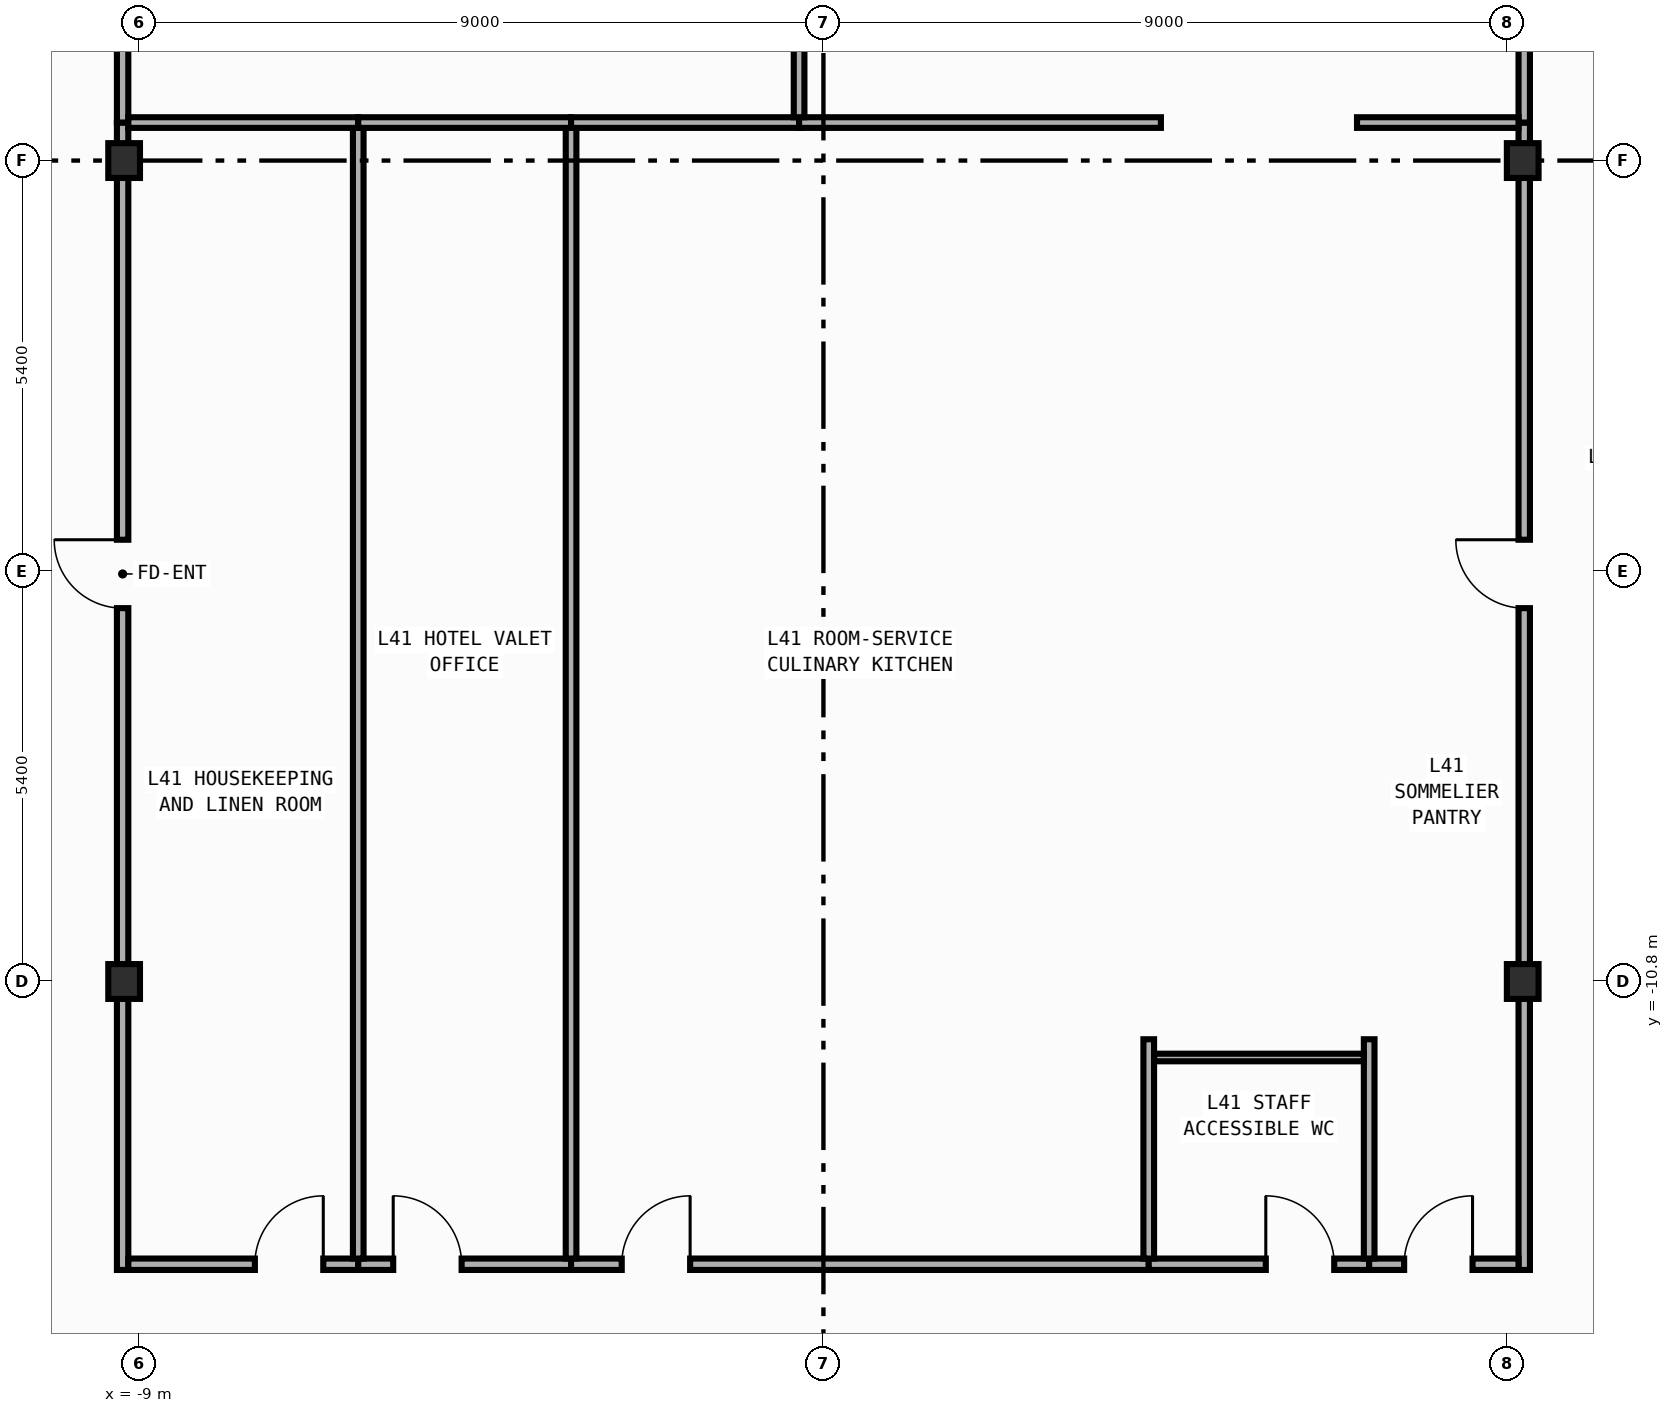
"""IFC4 building model, lengths in metres.
Left out: names, types, materials, properties, quantities, classifications, styles, units other than length and angle.
Written with IfcOpenShell. Run it as: python <this file> out.ifc"""

import sys

from ifc_helpers import new_model, si_unit, direction, frame, frame_2d, origin, origin_2d, place, context, subcontext, project, spatial, rectangle, i_section, extrude, element, fill, save


model = new_model("IFC4")
c1 = context("Model", 3, precision=1e-05, world=origin(), true_north=direction((0.0, 1.0)))
c2 = subcontext(c1, "Body", "Model", "MODEL_VIEW")
j1 = project(units=[si_unit("LENGTHUNIT", "METRE"), si_unit("PLANEANGLEUNIT", "RADIAN")], contexts=[c1])
p1 = place(None, origin())
s1 = spatial("IfcSite", under=j1, at=p1, CompositionType="ELEMENT")
p2 = place(p1, origin())
s2 = spatial("IfcBuilding", under=s1, at=p2, CompositionType="ELEMENT")
p3 = place(p2, frame((0.0, 0.0, 180.2)))
s3 = spatial("IfcBuildingStorey", under=s2, at=p3, CompositionType="ELEMENT", Elevation=180.2)
for number, where, z_axis, x_axis in (
    (1, (-9.2, -10.8, 0.0), (0.0, 0.0, 1.0), (1.0, 0.0, 0.0)),
    (2, (-9.2, 0.0, 0.0), (0.0, 0.0, 1.0), (1.0, 0.0, 0.0)),
    (3, (9.2, -10.8, 0.0), (0.0, 0.0, 1.0), (1.0, 0.0, 0.0)),
    (4, (9.2, 0.0, 0.0), (0.0, 0.0, 1.0), (1.0, 0.0, 0.0)),
):
    element("IfcColumn", number, at=place(p3, frame(where, z_axis=z_axis, x_axis=x_axis)), inside=s3, PredefinedType="COLUMN", context=c2, shape_type="SweptSolid", body=[
        extrude(i_section(OverallWidth=0.417, OverallDepth=0.458, WebThickness=0.03, FlangeThickness=0.05, FilletRadius=0.022, at=origin_2d()), origin(), (0.0, 0.0, 1.0), 3.8),
    ])
p4 = place(p3, frame((-9.22, -14.595, 0.0), z_axis=(0.0, 0.0, 1.0), x_axis=(0.0, 1.0, 0.0)))
e5 = element("IfcWall", 5, at=p4, inside=s3, PredefinedType="PARTITIONING", context=c2, shape_type="SweptSolid", body=[
    extrude(rectangle(XDim=15.095, YDim=0.15, at=frame_2d((7.547, 0.0))), origin(), (0.0, 0.0, 1.0), 2.952),
])
p5 = place(p4, frame((8.707, 0.0, 0.0)))
e6 = element("IfcOpeningElement", 6, at=p5, cuts=e5, PredefinedType="OPENING", context=c2, shape_type="SweptSolid", body=[
    extrude(rectangle(XDim=0.9, YDim=2.15, at=frame_2d((0.45, 1.075))), frame((0.0, 0.085, 0.0), z_axis=(0.0, -1.0, 0.0), x_axis=(1.0, 0.0, 0.0)), (0.0, 0.0, 1.0), 0.17),
])
p6 = place(p3, frame((-9.22, 0.5, 0.0), z_axis=(0.0, 0.0, 1.0), x_axis=(0.0, 1.0, 0.0)))
e7 = element("IfcWall", 7, at=p6, inside=s3, PredefinedType="PARTITIONING", context=c2, shape_type="SweptSolid", body=[
    extrude(rectangle(XDim=15.395, YDim=0.15, at=frame_2d((7.698, 0.0))), origin(), (0.0, 0.0, 1.0), 2.952),
])
p7 = place(p6, frame((4.512, 0.0, 0.0)))
e8 = element("IfcOpeningElement", 8, at=p7, cuts=e7, PredefinedType="OPENING", context=c2, shape_type="SweptSolid", body=[
    extrude(rectangle(XDim=0.9, YDim=2.15, at=frame_2d((0.45, 1.075))), frame((0.0, 0.085, 0.0), z_axis=(0.0, -1.0, 0.0), x_axis=(1.0, 0.0, 0.0)), (0.0, 0.0, 1.0), 0.17),
])
p8 = place(p3, frame((9.22, -14.595, 0.0), z_axis=(0.0, 0.0, 1.0), x_axis=(0.0, 1.0, 0.0)))
e9 = element("IfcWall", 9, at=p8, inside=s3, PredefinedType="PARTITIONING", context=c2, shape_type="SweptSolid", body=[
    extrude(rectangle(XDim=15.095, YDim=0.15, at=frame_2d((7.547, 0.0))), origin(), (0.0, 0.0, 1.0), 2.952),
])
p9 = place(p8, frame((8.707, 0.0, 0.0)))
e10 = element("IfcOpeningElement", 10, at=p9, cuts=e9, PredefinedType="OPENING", context=c2, shape_type="SweptSolid", body=[
    extrude(rectangle(XDim=0.9, YDim=2.15, at=frame_2d((0.45, 1.075))), frame((0.0, 0.085, 0.0), z_axis=(0.0, -1.0, 0.0), x_axis=(1.0, 0.0, 0.0)), (0.0, 0.0, 1.0), 0.17),
])
p10 = place(p3, frame((9.22, 0.5, 0.0), z_axis=(0.0, 0.0, 1.0), x_axis=(0.0, 1.0, 0.0)))
e11 = element("IfcWall", 11, at=p10, inside=s3, PredefinedType="PARTITIONING", context=c2, shape_type="SweptSolid", body=[
    extrude(rectangle(XDim=15.395, YDim=0.15, at=frame_2d((7.698, 0.0))), origin(), (0.0, 0.0, 1.0), 2.952),
])
p11 = place(p10, frame((4.512, 0.0, 0.0)))
e12 = element("IfcOpeningElement", 12, at=p11, cuts=e11, PredefinedType="OPENING", context=c2, shape_type="SweptSolid", body=[
    extrude(rectangle(XDim=0.9, YDim=2.15, at=frame_2d((0.45, 1.075))), frame((0.0, 0.085, 0.0), z_axis=(0.0, -1.0, 0.0), x_axis=(1.0, 0.0, 0.0)), (0.0, 0.0, 1.0), 0.17),
])
p12 = place(p3, frame((-9.145, -14.52, 0.0), z_axis=(0.0, 0.0, 1.0), x_axis=(1.0, 0.0, 0.0)))
e13 = element("IfcWall", 13, at=p12, inside=s3, PredefinedType="PARTITIONING", context=c2, shape_type="SweptSolid", body=[
    extrude(rectangle(XDim=3.025, YDim=0.15, at=frame_2d((1.512, 0.0))), origin(), (0.0, 0.0, 1.0), 3.54),
])
p13 = place(p12, frame((1.665, 0.0, 0.0)))
e14 = element("IfcOpeningElement", 14, at=p13, cuts=e13, PredefinedType="OPENING", context=c2, shape_type="SweptSolid", body=[
    extrude(rectangle(XDim=0.9, YDim=2.15, at=frame_2d((0.45, 1.075))), frame((0.0, 0.085, 0.0), z_axis=(0.0, -1.0, 0.0), x_axis=(1.0, 0.0, 0.0)), (0.0, 0.0, 1.0), 0.17),
])
p14 = place(p3, frame((-6.12, -14.52, 0.0), z_axis=(0.0, 0.0, 1.0), x_axis=(1.0, 0.0, 0.0)))
e15 = element("IfcWall", 15, at=p14, inside=s3, PredefinedType="PARTITIONING", context=c2, shape_type="SweptSolid", body=[
    extrude(rectangle(XDim=2.8, YDim=0.15, at=frame_2d((1.4, 0.0))), origin(), (0.0, 0.0, 1.0), 3.54),
])
p15 = place(p14, frame((0.46, 0.0, 0.0)))
e16 = element("IfcOpeningElement", 16, at=p15, cuts=e15, PredefinedType="OPENING", context=c2, shape_type="SweptSolid", body=[
    extrude(rectangle(XDim=0.9, YDim=2.15, at=frame_2d((0.45, 1.075))), frame((0.0, 0.085, 0.0), z_axis=(0.0, -1.0, 0.0), x_axis=(1.0, 0.0, 0.0)), (0.0, 0.0, 1.0), 0.17),
])
p16 = place(p3, frame((-3.32, -14.52, 0.0), z_axis=(0.0, 0.0, 1.0), x_axis=(1.0, 0.0, 0.0)))
e17 = element("IfcWall", 17, at=p16, inside=s3, PredefinedType="PARTITIONING", context=c2, shape_type="SweptSolid", body=[
    extrude(rectangle(XDim=7.6, YDim=0.15, at=frame_2d((3.8, 0.0))), origin(), (0.0, 0.0, 1.0), 3.54),
])
p17 = place(p16, frame((0.667, 0.0, 0.0)))
e18 = element("IfcOpeningElement", 18, at=p17, cuts=e17, PredefinedType="OPENING", context=c2, shape_type="SweptSolid", body=[
    extrude(rectangle(XDim=0.9, YDim=2.15, at=frame_2d((0.45, 1.075))), frame((0.0, 0.085, 0.0), z_axis=(0.0, -1.0, 0.0), x_axis=(1.0, 0.0, 0.0)), (0.0, 0.0, 1.0), 0.17),
])
p18 = place(p3, frame((4.28, -14.52, 0.0), z_axis=(0.0, 0.0, 1.0), x_axis=(1.0, 0.0, 0.0)))
e19 = element("IfcWall", 19, at=p18, inside=s3, PredefinedType="PARTITIONING", context=c2, shape_type="SweptSolid", body=[
    extrude(rectangle(XDim=2.9, YDim=0.15, at=frame_2d((1.45, 0.0))), origin(), (0.0, 0.0, 1.0), 3.54),
])
p19 = place(p18, frame((1.54, 0.0, 0.0)))
e20 = element("IfcOpeningElement", 20, at=p19, cuts=e19, PredefinedType="OPENING", context=c2, shape_type="SweptSolid", body=[
    extrude(rectangle(XDim=0.9, YDim=2.15, at=frame_2d((0.45, 1.075))), frame((0.0, 0.085, 0.0), z_axis=(0.0, -1.0, 0.0), x_axis=(1.0, 0.0, 0.0)), (0.0, 0.0, 1.0), 0.17),
])
p20 = place(p3, frame((7.18, -14.52, 0.0), z_axis=(0.0, 0.0, 1.0), x_axis=(1.0, 0.0, 0.0)))
e21 = element("IfcWall", 21, at=p20, inside=s3, PredefinedType="PARTITIONING", context=c2, shape_type="SweptSolid", body=[
    extrude(rectangle(XDim=1.965, YDim=0.15, at=frame_2d((0.982, 0.0))), origin(), (0.0, 0.0, 1.0), 3.54),
])
p21 = place(p20, frame((0.46, 0.0, 0.0)))
e22 = element("IfcOpeningElement", 22, at=p21, cuts=e21, PredefinedType="OPENING", context=c2, shape_type="SweptSolid", body=[
    extrude(rectangle(XDim=0.9, YDim=2.15, at=frame_2d((0.45, 1.075))), frame((0.0, 0.085, 0.0), z_axis=(0.0, -1.0, 0.0), x_axis=(1.0, 0.0, 0.0)), (0.0, 0.0, 1.0), 0.17),
])
p22 = place(p3, frame((-6.12, -14.445, 0.0), z_axis=(0.0, 0.0, 1.0), x_axis=(0.0, 1.0, 0.0)))
e23 = element("IfcWall", 23, at=p22, inside=s3, PredefinedType="PARTITIONING", context=c2, shape_type="SweptSolid", body=[
    extrude(rectangle(XDim=14.875, YDim=0.14, at=frame_2d((7.438, 0.0))), origin(), (0.0, 0.0, 1.0), 3.54),
])
p23 = place(p3, frame((-9.145, 0.5, 0.0), z_axis=(0.0, 0.0, 1.0), x_axis=(1.0, 0.0, 0.0)))
e24 = element("IfcWall", 24, at=p23, inside=s3, PredefinedType="PARTITIONING", context=c2, shape_type="SweptSolid", body=[
    extrude(rectangle(XDim=3.025, YDim=0.14, at=frame_2d((1.512, 0.0))), origin(), (0.0, 0.0, 1.0), 3.54),
])
p24 = place(p3, frame((-3.32, -14.445, 0.0), z_axis=(0.0, 0.0, 1.0), x_axis=(0.0, 1.0, 0.0)))
e25 = element("IfcWall", 25, at=p24, inside=s3, PredefinedType="PARTITIONING", context=c2, shape_type="SweptSolid", body=[
    extrude(rectangle(XDim=14.875, YDim=0.14, at=frame_2d((7.438, 0.0))), origin(), (0.0, 0.0, 1.0), 3.54),
])
p25 = place(p3, frame((-6.12, 0.5, 0.0), z_axis=(0.0, 0.0, 1.0), x_axis=(1.0, 0.0, 0.0)))
e26 = element("IfcWall", 26, at=p25, inside=s3, PredefinedType="PARTITIONING", context=c2, shape_type="SweptSolid", body=[
    extrude(rectangle(XDim=2.8, YDim=0.14, at=frame_2d((1.4, 0.0))), origin(), (0.0, 0.0, 1.0), 3.54),
])
p26 = place(p3, frame((4.28, -14.445, 0.0), z_axis=(0.0, 0.0, 1.0), x_axis=(0.0, 1.0, 0.0)))
e27 = element("IfcWall", 27, at=p26, inside=s3, PredefinedType="PARTITIONING", context=c2, shape_type="SweptSolid", body=[
    extrude(rectangle(XDim=2.885, YDim=0.14, at=frame_2d((1.442, 0.0))), origin(), (0.0, 0.0, 1.0), 3.54),
])
p27 = place(p3, frame((-3.32, 0.5, 0.0), z_axis=(0.0, 0.0, 1.0), x_axis=(1.0, 0.0, 0.0)))
e28 = element("IfcWall", 28, at=p27, inside=s3, PredefinedType="PARTITIONING", context=c2, shape_type="SweptSolid", body=[
    extrude(rectangle(XDim=3.0, YDim=0.14, at=frame_2d((1.5, 0.0))), origin(), (0.0, 0.0, 1.0), 3.54),
])
p28 = place(p3, frame((-0.32, 0.5, 0.0), z_axis=(0.0, 0.0, 1.0), x_axis=(1.0, 0.0, 0.0)))
e29 = element("IfcWall", 29, at=p28, inside=s3, PredefinedType="PARTITIONING", context=c2, shape_type="SweptSolid", body=[
    extrude(rectangle(XDim=4.76, YDim=0.14, at=frame_2d((2.38, 0.0))), origin(), (0.0, 0.0, 1.0), 3.54),
])
p29 = place(p3, frame((7.18, -14.445, 0.0), z_axis=(0.0, 0.0, 1.0), x_axis=(0.0, 1.0, 0.0)))
e30 = element("IfcWall", 30, at=p29, inside=s3, PredefinedType="PARTITIONING", context=c2, shape_type="SweptSolid", body=[
    extrude(rectangle(XDim=2.885, YDim=0.14, at=frame_2d((1.442, 0.0))), origin(), (0.0, 0.0, 1.0), 3.54),
])
p30 = place(p3, frame((7.02, 0.5, 0.0), z_axis=(0.0, 0.0, 1.0), x_axis=(1.0, 0.0, 0.0)))
e31 = element("IfcWall", 31, at=p30, inside=s3, PredefinedType="PARTITIONING", context=c2, shape_type="SweptSolid", body=[
    extrude(rectangle(XDim=2.125, YDim=0.14, at=frame_2d((1.062, 0.0))), origin(), (0.0, 0.0, 1.0), 3.54),
])
p31 = place(p3, frame((-0.32, 0.57, 0.0), z_axis=(0.0, 0.0, 1.0), x_axis=(0.0, 1.0, 0.0)))
e32 = element("IfcWall", 32, at=p31, inside=s3, PredefinedType="PARTITIONING", context=c2, shape_type="SweptSolid", body=[
    extrude(rectangle(XDim=15.175, YDim=0.14, at=frame_2d((7.587, 0.0))), origin(), (0.0, 0.0, 1.0), 3.54),
])
p32 = place(p3, frame((4.35, -11.8, 0.0), z_axis=(0.0, 0.0, 1.0), x_axis=(1.0, 0.0, 0.0)))
e33 = element("IfcWall", 33, at=p32, inside=s3, PredefinedType="PARTITIONING", context=c2, shape_type="SweptSolid", body=[
    extrude(rectangle(XDim=2.76, YDim=0.1, at=frame_2d((1.38, 0.0))), origin(), (0.0, 0.0, 1.0), 3.54),
])
p33 = place(p5, origin())
e34 = element("IfcDoor", 34, at=p33, inside=s3, OperationType="SINGLE_SWING_RIGHT", PredefinedType="DOOR", context=c2, shape_type="SweptSolid", body=[
    extrude(rectangle(XDim=0.9, YDim=2.15, at=frame_2d((0.45, 1.075))), frame((0.0, 0.025, 0.0), z_axis=(0.0, -1.0, 0.0), x_axis=(1.0, 0.0, 0.0)), (0.0, 0.0, 1.0), 0.05),
])
fill(e6, e34)
p34 = place(p9, origin())
e35 = element("IfcDoor", 35, at=p34, inside=s3, OperationType="SINGLE_SWING_RIGHT", PredefinedType="DOOR", context=c2, shape_type="SweptSolid", body=[
    extrude(rectangle(XDim=0.9, YDim=2.15, at=frame_2d((0.45, 1.075))), frame((0.0, 0.025, 0.0), z_axis=(0.0, -1.0, 0.0), x_axis=(1.0, 0.0, 0.0)), (0.0, 0.0, 1.0), 0.05),
])
fill(e10, e35)
p35 = place(p13, origin())
e36 = element("IfcDoor", 36, at=p35, inside=s3, OperationType="SINGLE_SWING_RIGHT", PredefinedType="DOOR", context=c2, shape_type="SweptSolid", body=[
    extrude(rectangle(XDim=0.9, YDim=2.15, at=frame_2d((0.45, 1.075))), frame((0.0, 0.025, 0.0), z_axis=(0.0, -1.0, 0.0), x_axis=(1.0, 0.0, 0.0)), (0.0, 0.0, 1.0), 0.05),
])
fill(e14, e36)
p36 = place(p15, origin())
e37 = element("IfcDoor", 37, at=p36, inside=s3, OperationType="SINGLE_SWING_LEFT", PredefinedType="DOOR", context=c2, shape_type="SweptSolid", body=[
    extrude(rectangle(XDim=0.9, YDim=2.15, at=frame_2d((0.45, 1.075))), frame((0.0, 0.025, 0.0), z_axis=(0.0, -1.0, 0.0), x_axis=(1.0, 0.0, 0.0)), (0.0, 0.0, 1.0), 0.05),
])
fill(e16, e37)
p37 = place(p17, origin())
e38 = element("IfcDoor", 38, at=p37, inside=s3, OperationType="SINGLE_SWING_RIGHT", PredefinedType="DOOR", context=c2, shape_type="SweptSolid", body=[
    extrude(rectangle(XDim=0.9, YDim=2.15, at=frame_2d((0.45, 1.075))), frame((0.0, 0.025, 0.0), z_axis=(0.0, -1.0, 0.0), x_axis=(1.0, 0.0, 0.0)), (0.0, 0.0, 1.0), 0.05),
])
fill(e18, e38)
p38 = place(p19, origin())
e39 = element("IfcDoor", 39, at=p38, inside=s3, OperationType="SINGLE_SWING_LEFT", PredefinedType="DOOR", context=c2, shape_type="SweptSolid", body=[
    extrude(rectangle(XDim=0.9, YDim=2.15, at=frame_2d((0.45, 1.075))), frame((0.0, 0.025, 0.0), z_axis=(0.0, -1.0, 0.0), x_axis=(1.0, 0.0, 0.0)), (0.0, 0.0, 1.0), 0.05),
])
fill(e20, e39)
p39 = place(p21, origin())
e40 = element("IfcDoor", 40, at=p39, inside=s3, OperationType="SINGLE_SWING_RIGHT", PredefinedType="DOOR", context=c2, shape_type="SweptSolid", body=[
    extrude(rectangle(XDim=0.9, YDim=2.15, at=frame_2d((0.45, 1.075))), frame((0.0, 0.025, 0.0), z_axis=(0.0, -1.0, 0.0), x_axis=(1.0, 0.0, 0.0)), (0.0, 0.0, 1.0), 0.05),
])
fill(e22, e40)
save(model, sys.argv[1])
